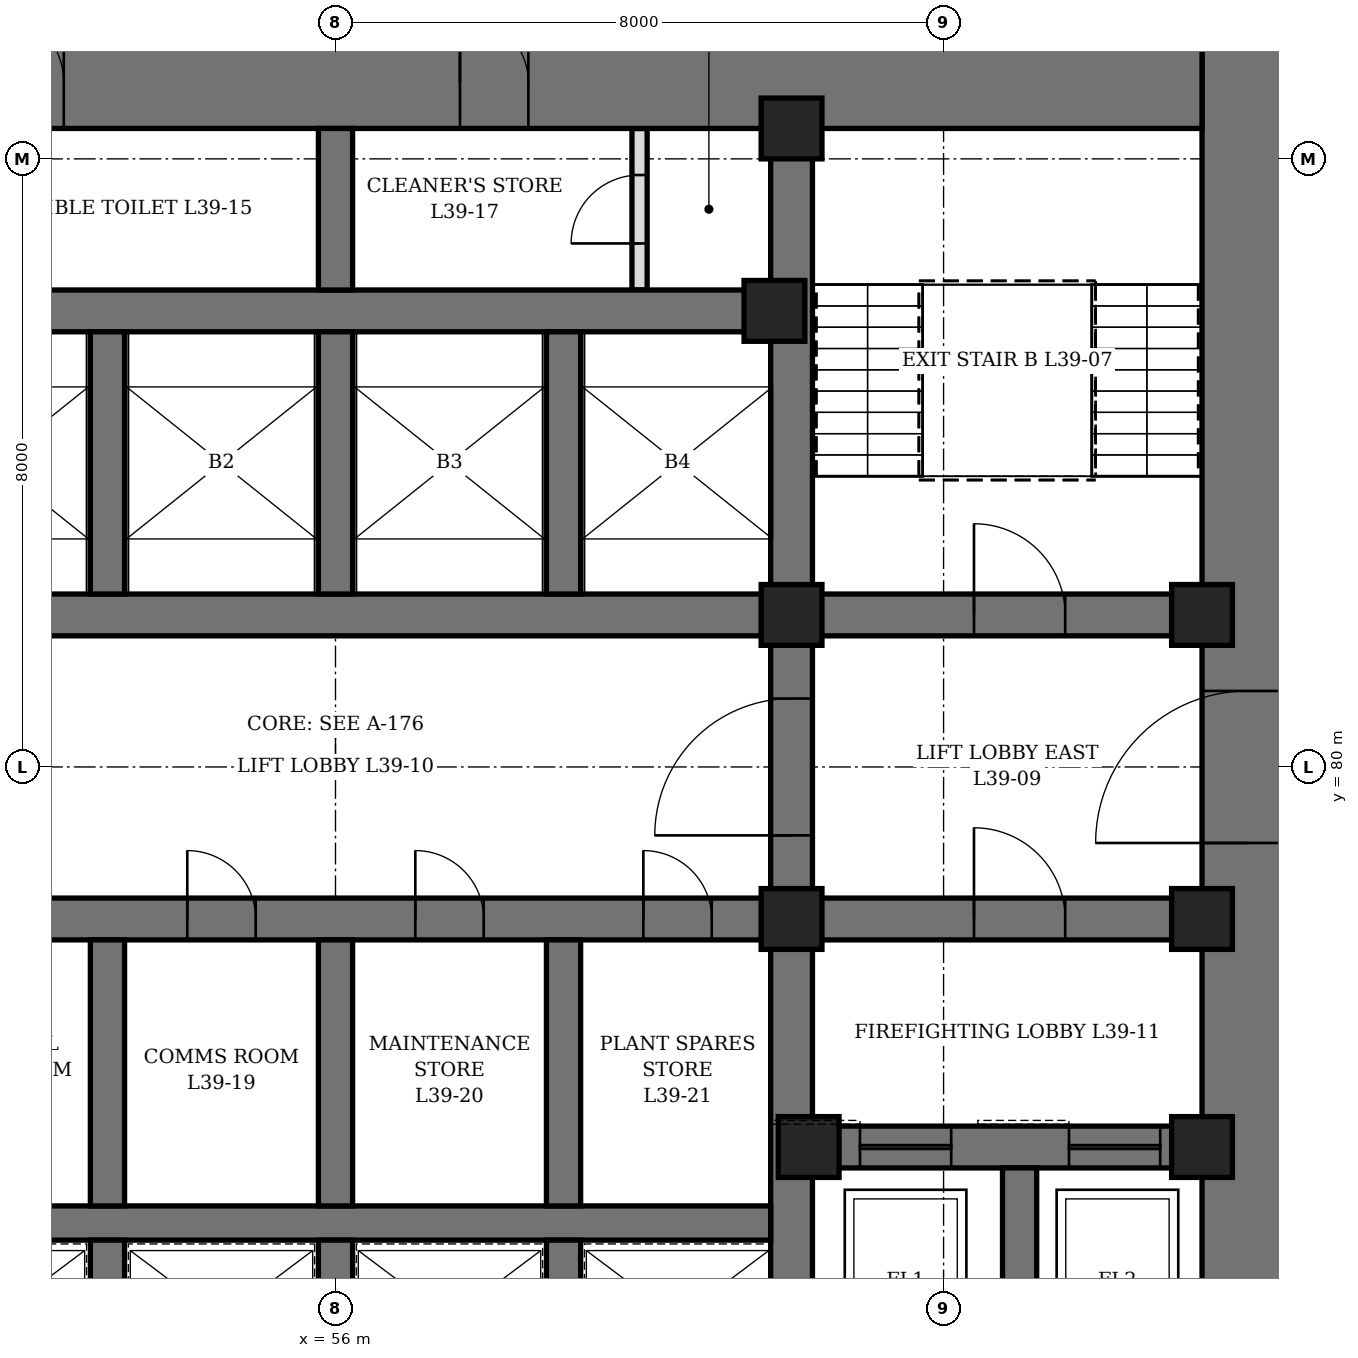
"""IFC4 building model, lengths in metres.
Left out: names, types, materials, properties, quantities, classifications, styles, units other than length and angle.
Written with IfcOpenShell. Run it as: python <this file> out.ifc"""

import sys

from ifc_helpers import new_model, si_unit, direction, frame, frame_2d, origin, origin_2d, place, context, subcontext, project, spatial, rectangle, hollow_rectangle, extrude, element, fill, save


model = new_model("IFC4")
c1 = context("Model", 3, precision=1e-05, world=origin(), true_north=direction((0.0, 1.0)))
c2 = subcontext(c1, "Body", "Model", "MODEL_VIEW")
j1 = project(units=[si_unit("LENGTHUNIT", "METRE"), si_unit("PLANEANGLEUNIT", "RADIAN")], contexts=[c1])
p1 = place(None, origin())
s1 = spatial("IfcSite", under=j1, at=p1, CompositionType="ELEMENT")
p2 = place(p1, origin())
s2 = spatial("IfcBuilding", under=s1, at=p2, CompositionType="ELEMENT")
p3 = place(p2, frame((0.0, 0.0, 175.3)))
s3 = spatial("IfcBuildingStorey", under=s2, at=p3, CompositionType="ELEMENT", Elevation=175.3)
p4 = place(p3, frame((68.0, 70.4, 0.0), z_axis=(0.0, 0.0, 1.0), x_axis=(0.0, 1.0, 0.0)))
e1 = element("IfcWall", 1, at=p4, inside=s3, PredefinedType="SHEAR", context=c2, shape_type="SweptSolid", body=[
    extrude(rectangle(XDim=19.2, YDim=1.2, at=frame_2d((9.6, 0.0))), origin(), (0.0, 0.0, 1.0), 6.0),
])
p5 = place(p4, frame((8.6, 0.0, 0.0)))
e2 = element("IfcOpeningElement", 2, at=p5, cuts=e1, PredefinedType="OPENING", context=c2, shape_type="SweptSolid", body=[
    extrude(rectangle(XDim=2.0, YDim=2.4, at=frame_2d((1.0, 1.2))), frame((0.0, 0.61, 0.0), z_axis=(0.0, -1.0, 0.0), x_axis=(1.0, 0.0, 0.0)), (0.0, 0.0, 1.0), 1.22),
])
p6 = place(p3, frame((44.6, 89.0, 0.0), z_axis=(0.0, 0.0, 1.0), x_axis=(1.0, 0.0, 0.0)))
e3 = element("IfcWall", 3, at=p6, inside=s3, PredefinedType="SHEAR", context=c2, shape_type="SweptSolid", body=[
    extrude(rectangle(XDim=22.8, YDim=1.2, at=frame_2d((11.4, 0.0))), origin(), (0.0, 0.0, 1.0), 6.0),
])
p7 = place(p6, frame((6.825, 0.0, 0.0)))
e4 = element("IfcOpeningElement", 4, at=p7, cuts=e3, PredefinedType="OPENING", context=c2, shape_type="SweptSolid", body=[
    extrude(rectangle(XDim=1.0, YDim=2.1, at=frame_2d((0.5, 1.05))), frame((0.0, 0.61, 0.0), z_axis=(0.0, -1.0, 0.0), x_axis=(1.0, 0.0, 0.0)), (0.0, 0.0, 1.0), 1.22),
])
p8 = place(p6, frame((13.038, 0.0, 0.0)))
e5 = element("IfcOpeningElement", 5, at=p8, cuts=e3, PredefinedType="OPENING", context=c2, shape_type="SweptSolid", body=[
    extrude(rectangle(XDim=0.9, YDim=2.1, at=frame_2d((0.45, 1.05))), frame((0.0, 0.61, 0.0), z_axis=(0.0, -1.0, 0.0), x_axis=(1.0, 0.0, 0.0)), (0.0, 0.0, 1.0), 1.22),
])
p9 = place(p3, frame((62.0, 71.6, 0.0), z_axis=(0.0, 0.0, 1.0), x_axis=(0.0, 1.0, 0.0)))
e6 = element("IfcWall", 6, at=p9, inside=s3, PredefinedType="SHEAR", context=c2, shape_type="SweptSolid", body=[
    extrude(rectangle(XDim=16.8, YDim=0.55, at=frame_2d((8.4, 0.0))), origin(), (0.0, 0.0, 1.0), 6.0),
])
p10 = place(p9, frame((7.5, 0.0, 0.0)))
e7 = element("IfcOpeningElement", 7, at=p10, cuts=e6, PredefinedType="OPENING", context=c2, shape_type="SweptSolid", body=[
    extrude(rectangle(XDim=1.8, YDim=2.4, at=frame_2d((0.9, 1.2))), frame((0.0, 0.285, 0.0), z_axis=(0.0, -1.0, 0.0), x_axis=(1.0, 0.0, 0.0)), (0.0, 0.0, 1.0), 0.57),
])
p11 = place(p3, frame((62.275, 75.0, 0.0), z_axis=(0.0, 0.0, 1.0), x_axis=(1.0, 0.0, 0.0)))
e8 = element("IfcWall", 8, at=p11, inside=s3, PredefinedType="SHEAR", context=c2, shape_type="SweptSolid", body=[
    extrude(rectangle(XDim=5.125, YDim=0.55, at=frame_2d((2.562, 0.0))), origin(), (0.0, 0.0, 1.0), 6.0),
])
p12 = place(p11, frame((0.625, 0.0, 0.0)))
e9 = element("IfcOpeningElement", 9, at=p12, cuts=e8, PredefinedType="OPENING", context=c2, shape_type="SweptSolid", body=[
    extrude(rectangle(XDim=1.2, YDim=2.2, at=frame_2d((0.6, 1.1))), frame((0.0, 0.285, 0.0), z_axis=(0.0, -1.0, 0.0), x_axis=(1.0, 0.0, 0.0)), (0.0, 0.0, 1.0), 0.57),
])
p13 = place(p11, frame((3.375, 0.0, 0.0)))
e10 = element("IfcOpeningElement", 10, at=p13, cuts=e8, PredefinedType="OPENING", context=c2, shape_type="SweptSolid", body=[
    extrude(rectangle(XDim=1.2, YDim=2.2, at=frame_2d((0.6, 1.1))), frame((0.0, 0.285, 0.0), z_axis=(0.0, -1.0, 0.0), x_axis=(1.0, 0.0, 0.0)), (0.0, 0.0, 1.0), 0.57),
])
p14 = place(p3, frame((62.275, 78.0, 0.0), z_axis=(0.0, 0.0, 1.0), x_axis=(1.0, 0.0, 0.0)))
e11 = element("IfcWall", 11, at=p14, inside=s3, PredefinedType="SHEAR", context=c2, shape_type="SweptSolid", body=[
    extrude(rectangle(XDim=5.125, YDim=0.55, at=frame_2d((2.562, 0.0))), origin(), (0.0, 0.0, 1.0), 6.0),
])
p15 = place(p14, frame((2.125, 0.0, 0.0)))
e12 = element("IfcOpeningElement", 12, at=p15, cuts=e11, PredefinedType="OPENING", context=c2, shape_type="SweptSolid", body=[
    extrude(rectangle(XDim=1.2, YDim=2.1, at=frame_2d((0.6, 1.05))), frame((0.0, 0.285, 0.0), z_axis=(0.0, -1.0, 0.0), x_axis=(1.0, 0.0, 0.0)), (0.0, 0.0, 1.0), 0.57),
])
p16 = place(p3, frame((62.275, 82.0, 0.0), z_axis=(0.0, 0.0, 1.0), x_axis=(1.0, 0.0, 0.0)))
e13 = element("IfcWall", 13, at=p16, inside=s3, PredefinedType="SHEAR", context=c2, shape_type="SweptSolid", body=[
    extrude(rectangle(XDim=5.125, YDim=0.55, at=frame_2d((2.562, 0.0))), origin(), (0.0, 0.0, 1.0), 6.0),
])
p17 = place(p16, frame((2.125, 0.0, 0.0)))
e14 = element("IfcOpeningElement", 14, at=p17, cuts=e13, PredefinedType="OPENING", context=c2, shape_type="SweptSolid", body=[
    extrude(rectangle(XDim=1.2, YDim=2.1, at=frame_2d((0.6, 1.05))), frame((0.0, 0.285, 0.0), z_axis=(0.0, -1.0, 0.0), x_axis=(1.0, 0.0, 0.0)), (0.0, 0.0, 1.0), 0.57),
])
p18 = place(p3, frame((50.275, 78.0, 0.0), z_axis=(0.0, 0.0, 1.0), x_axis=(1.0, 0.0, 0.0)))
e15 = element("IfcWall", 15, at=p18, inside=s3, PredefinedType="SHEAR", context=c2, shape_type="SweptSolid", body=[
    extrude(rectangle(XDim=11.45, YDim=0.55, at=frame_2d((5.725, 0.0))), origin(), (0.0, 0.0, 1.0), 6.0),
])
p19 = place(p18, frame((0.775, 0.0, 0.0)))
e16 = element("IfcOpeningElement", 16, at=p19, cuts=e15, PredefinedType="OPENING", context=c2, shape_type="SweptSolid", body=[
    extrude(rectangle(XDim=0.9, YDim=2.1, at=frame_2d((0.45, 1.05))), frame((0.0, 0.285, 0.0), z_axis=(0.0, -1.0, 0.0), x_axis=(1.0, 0.0, 0.0)), (0.0, 0.0, 1.0), 0.57),
])
p20 = place(p18, frame((3.775, 0.0, 0.0)))
e17 = element("IfcOpeningElement", 17, at=p20, cuts=e15, PredefinedType="OPENING", context=c2, shape_type="SweptSolid", body=[
    extrude(rectangle(XDim=0.9, YDim=2.1, at=frame_2d((0.45, 1.05))), frame((0.0, 0.285, 0.0), z_axis=(0.0, -1.0, 0.0), x_axis=(1.0, 0.0, 0.0)), (0.0, 0.0, 1.0), 0.57),
])
p21 = place(p18, frame((6.775, 0.0, 0.0)))
e18 = element("IfcOpeningElement", 18, at=p21, cuts=e15, PredefinedType="OPENING", context=c2, shape_type="SweptSolid", body=[
    extrude(rectangle(XDim=0.9, YDim=2.1, at=frame_2d((0.45, 1.05))), frame((0.0, 0.285, 0.0), z_axis=(0.0, -1.0, 0.0), x_axis=(1.0, 0.0, 0.0)), (0.0, 0.0, 1.0), 0.57),
])
p22 = place(p18, frame((9.775, 0.0, 0.0)))
e19 = element("IfcOpeningElement", 19, at=p22, cuts=e15, PredefinedType="OPENING", context=c2, shape_type="SweptSolid", body=[
    extrude(rectangle(XDim=0.9, YDim=2.1, at=frame_2d((0.45, 1.05))), frame((0.0, 0.285, 0.0), z_axis=(0.0, -1.0, 0.0), x_axis=(1.0, 0.0, 0.0)), (0.0, 0.0, 1.0), 0.57),
])
for number, where, z_axis, x_axis in (
    (20, (50.275, 82.0, 0.0), (0.0, 0.0, 1.0), (1.0, 0.0, 0.0)),
    (21, (50.275, 86.0, 0.0), (0.0, 0.0, 1.0), (1.0, 0.0, 0.0)),
):
    element("IfcWall", number, at=place(p3, frame(where, z_axis=z_axis, x_axis=x_axis)), inside=s3, PredefinedType="SHEAR", context=c2, shape_type="SweptSolid", body=[
        extrude(rectangle(XDim=11.45, YDim=0.55, at=frame_2d((5.725, 0.0))), origin(), (0.0, 0.0, 1.0), 6.0),
    ])
p23 = place(p3, frame((50.275, 74.0, 0.0), z_axis=(0.0, 0.0, 1.0), x_axis=(1.0, 0.0, 0.0)))
e22 = element("IfcWall", 22, at=p23, inside=s3, PredefinedType="SHEAR", context=c2, shape_type="SweptSolid", body=[
    extrude(rectangle(XDim=11.45, YDim=0.45, at=frame_2d((5.725, 0.0))), origin(), (0.0, 0.0, 1.0), 6.0),
])
p24 = place(p3, frame((53.0, 71.6, 0.0), z_axis=(0.0, 0.0, 1.0), x_axis=(0.0, 1.0, 0.0)))
e23 = element("IfcWall", 23, at=p24, inside=s3, PredefinedType="SHEAR", context=c2, shape_type="SweptSolid", body=[
    extrude(rectangle(XDim=2.175, YDim=0.45, at=frame_2d((1.087, 0.0))), origin(), (0.0, 0.0, 1.0), 6.0),
])
p25 = place(p3, frame((53.0, 74.225, 0.0), z_axis=(0.0, 0.0, 1.0), x_axis=(0.0, 1.0, 0.0)))
e24 = element("IfcWall", 24, at=p25, inside=s3, PredefinedType="SHEAR", context=c2, shape_type="SweptSolid", body=[
    extrude(rectangle(XDim=3.5, YDim=0.45, at=frame_2d((1.75, 0.0))), origin(), (0.0, 0.0, 1.0), 6.0),
])
p26 = place(p3, frame((53.0, 82.275, 0.0), z_axis=(0.0, 0.0, 1.0), x_axis=(0.0, 1.0, 0.0)))
e25 = element("IfcWall", 25, at=p26, inside=s3, PredefinedType="SHEAR", context=c2, shape_type="SweptSolid", body=[
    extrude(rectangle(XDim=3.45, YDim=0.45, at=frame_2d((1.725, 0.0))), origin(), (0.0, 0.0, 1.0), 6.0),
])
p27 = place(p3, frame((56.0, 71.6, 0.0), z_axis=(0.0, 0.0, 1.0), x_axis=(0.0, 1.0, 0.0)))
e26 = element("IfcWall", 26, at=p27, inside=s3, PredefinedType="SHEAR", context=c2, shape_type="SweptSolid", body=[
    extrude(rectangle(XDim=2.175, YDim=0.45, at=frame_2d((1.087, 0.0))), origin(), (0.0, 0.0, 1.0), 6.0),
])
p28 = place(p3, frame((56.0, 74.225, 0.0), z_axis=(0.0, 0.0, 1.0), x_axis=(0.0, 1.0, 0.0)))
e27 = element("IfcWall", 27, at=p28, inside=s3, PredefinedType="SHEAR", context=c2, shape_type="SweptSolid", body=[
    extrude(rectangle(XDim=3.5, YDim=0.45, at=frame_2d((1.75, 0.0))), origin(), (0.0, 0.0, 1.0), 6.0),
])
p29 = place(p3, frame((56.0, 82.275, 0.0), z_axis=(0.0, 0.0, 1.0), x_axis=(0.0, 1.0, 0.0)))
e28 = element("IfcWall", 28, at=p29, inside=s3, PredefinedType="SHEAR", context=c2, shape_type="SweptSolid", body=[
    extrude(rectangle(XDim=3.45, YDim=0.45, at=frame_2d((1.725, 0.0))), origin(), (0.0, 0.0, 1.0), 6.0),
])
p30 = place(p3, frame((59.0, 71.6, 0.0), z_axis=(0.0, 0.0, 1.0), x_axis=(0.0, 1.0, 0.0)))
e29 = element("IfcWall", 29, at=p30, inside=s3, PredefinedType="SHEAR", context=c2, shape_type="SweptSolid", body=[
    extrude(rectangle(XDim=2.175, YDim=0.45, at=frame_2d((1.087, 0.0))), origin(), (0.0, 0.0, 1.0), 6.0),
])
p31 = place(p3, frame((59.0, 74.225, 0.0), z_axis=(0.0, 0.0, 1.0), x_axis=(0.0, 1.0, 0.0)))
e30 = element("IfcWall", 30, at=p31, inside=s3, PredefinedType="SHEAR", context=c2, shape_type="SweptSolid", body=[
    extrude(rectangle(XDim=3.5, YDim=0.45, at=frame_2d((1.75, 0.0))), origin(), (0.0, 0.0, 1.0), 6.0),
])
p32 = place(p3, frame((59.0, 82.275, 0.0), z_axis=(0.0, 0.0, 1.0), x_axis=(0.0, 1.0, 0.0)))
e31 = element("IfcWall", 31, at=p32, inside=s3, PredefinedType="SHEAR", context=c2, shape_type="SweptSolid", body=[
    extrude(rectangle(XDim=3.45, YDim=0.45, at=frame_2d((1.725, 0.0))), origin(), (0.0, 0.0, 1.0), 6.0),
])
p33 = place(p3, frame((65.0, 71.6, 0.0), z_axis=(0.0, 0.0, 1.0), x_axis=(0.0, 1.0, 0.0)))
e32 = element("IfcWall", 32, at=p33, inside=s3, PredefinedType="SHEAR", context=c2, shape_type="SweptSolid", body=[
    extrude(rectangle(XDim=3.125, YDim=0.45, at=frame_2d((1.562, 0.0))), origin(), (0.0, 0.0, 1.0), 6.0),
])
p34 = place(p3, frame((56.0, 86.275, 0.0), z_axis=(0.0, 0.0, 1.0), x_axis=(0.0, 1.0, 0.0)))
e33 = element("IfcWall", 33, at=p34, inside=s3, PredefinedType="SHEAR", context=c2, shape_type="SweptSolid", body=[
    extrude(rectangle(XDim=2.125, YDim=0.45, at=frame_2d((1.062, 0.0))), origin(), (0.0, 0.0, 1.0), 6.0),
])
for number, where, z_axis, x_axis in (
    (34, (61.775, 86.0, 0.0), (0.0, 0.0, 1.0), (1.0, 0.0, 0.0)),
    (35, (62.0, 78.0, 0.0), (0.0, 0.0, 1.0), (1.0, 0.0, 0.0)),
    (36, (62.0, 82.0, 0.0), (0.0, 0.0, 1.0), (1.0, 0.0, 0.0)),
    (37, (62.0, 88.4, 0.0), (0.0, 0.0, 1.0), (1.0, 0.0, 0.0)),
    (38, (62.225, 75.0, 0.0), (0.0, 0.0, 1.0), (1.0, 0.0, 0.0)),
    (39, (67.4, 75.0, 0.0), (0.0, 0.0, 1.0), (1.0, 0.0, 0.0)),
    (40, (67.4, 78.0, 0.0), (0.0, 0.0, 1.0), (1.0, 0.0, 0.0)),
    (41, (67.4, 82.0, 0.0), (0.0, 0.0, 1.0), (1.0, 0.0, 0.0)),
):
    element("IfcColumn", number, at=place(p3, frame(where, z_axis=z_axis, x_axis=x_axis)), inside=s3, PredefinedType="COLUMN", context=c2, shape_type="SweptSolid", body=[
        extrude(hollow_rectangle(XDim=0.8, YDim=0.8, WallThickness=0.1, at=origin_2d()), origin(), (0.0, 0.0, 1.0), 6.0),
    ])
p35 = place(p3, frame((60.0, 86.275, 0.0), z_axis=(0.0, 0.0, 1.0), x_axis=(0.0, 1.0, 0.0)))
e42 = element("IfcWall", 42, at=p35, inside=s3, PredefinedType="PARTITIONING", context=c2, shape_type="SweptSolid", body=[
    extrude(rectangle(XDim=2.125, YDim=0.2, at=frame_2d((1.062, 0.0))), origin(), (0.0, 0.0, 1.0), 5.75),
])
p36 = place(p35, frame((0.613, 0.0, 0.0)))
e43 = element("IfcOpeningElement", 43, at=p36, cuts=e42, PredefinedType="OPENING", context=c2, shape_type="SweptSolid", body=[
    extrude(rectangle(XDim=0.9, YDim=2.1, at=frame_2d((0.45, 1.05))), frame((0.0, 0.11, 0.0), z_axis=(0.0, -1.0, 0.0), x_axis=(1.0, 0.0, 0.0)), (0.0, 0.0, 1.0), 0.22),
])
p37 = place(p7, origin())
e44 = element("IfcDoor", 44, at=p37, inside=s3, OperationType="SINGLE_SWING_LEFT", PredefinedType="DOOR", context=c2, shape_type="SweptSolid", body=[
    extrude(rectangle(XDim=1.0, YDim=2.1, at=frame_2d((0.5, 1.05))), frame((0.0, 0.35, 0.0), z_axis=(0.0, -1.0, 0.0), x_axis=(1.0, 0.0, 0.0)), (0.0, 0.0, 1.0), 0.7),
])
fill(e4, e44)
p38 = place(p8, origin())
e45 = element("IfcDoor", 45, at=p38, inside=s3, OperationType="SINGLE_SWING_LEFT", PredefinedType="DOOR", context=c2, shape_type="SweptSolid", body=[
    extrude(rectangle(XDim=0.9, YDim=2.1, at=frame_2d((0.45, 1.05))), frame((0.0, 0.35, 0.0), z_axis=(0.0, -1.0, 0.0), x_axis=(1.0, 0.0, 0.0)), (0.0, 0.0, 1.0), 0.7),
])
fill(e5, e45)
p39 = place(p36, origin())
e46 = element("IfcDoor", 46, at=p39, inside=s3, OperationType="SINGLE_SWING_LEFT", PredefinedType="DOOR", context=c2, shape_type="SweptSolid", body=[
    extrude(rectangle(XDim=0.9, YDim=2.1, at=frame_2d((0.45, 1.05))), frame((0.0, 0.1, 0.0), z_axis=(0.0, -1.0, 0.0), x_axis=(1.0, 0.0, 0.0)), (0.0, 0.0, 1.0), 0.199),
])
fill(e43, e46)
p40 = place(p20, origin())
e47 = element("IfcDoor", 47, at=p40, inside=s3, OperationType="SINGLE_SWING_LEFT", PredefinedType="DOOR", context=c2, shape_type="SweptSolid", body=[
    extrude(rectangle(XDim=0.9, YDim=2.1, at=frame_2d((0.45, 1.05))), frame((0.0, 0.275, 0.0), z_axis=(0.0, -1.0, 0.0), x_axis=(1.0, 0.0, 0.0)), (0.0, 0.0, 1.0), 0.55),
])
fill(e17, e47)
p41 = place(p21, origin())
e48 = element("IfcDoor", 48, at=p41, inside=s3, OperationType="SINGLE_SWING_LEFT", PredefinedType="DOOR", context=c2, shape_type="SweptSolid", body=[
    extrude(rectangle(XDim=0.9, YDim=2.1, at=frame_2d((0.45, 1.05))), frame((0.0, 0.275, 0.0), z_axis=(0.0, -1.0, 0.0), x_axis=(1.0, 0.0, 0.0)), (0.0, 0.0, 1.0), 0.55),
])
fill(e18, e48)
p42 = place(p22, origin())
e49 = element("IfcDoor", 49, at=p42, inside=s3, OperationType="SINGLE_SWING_LEFT", PredefinedType="DOOR", context=c2, shape_type="SweptSolid", body=[
    extrude(rectangle(XDim=0.9, YDim=2.1, at=frame_2d((0.45, 1.05))), frame((0.0, 0.275, 0.0), z_axis=(0.0, -1.0, 0.0), x_axis=(1.0, 0.0, 0.0)), (0.0, 0.0, 1.0), 0.55),
])
fill(e19, e49)
p43 = place(p17, origin())
e50 = element("IfcDoor", 50, at=p43, inside=s3, OperationType="SINGLE_SWING_LEFT", PredefinedType="DOOR", context=c2, shape_type="SweptSolid", body=[
    extrude(rectangle(XDim=1.2, YDim=2.1, at=frame_2d((0.6, 1.05))), frame((0.0, 0.275, 0.0), z_axis=(0.0, -1.0, 0.0), x_axis=(1.0, 0.0, 0.0)), (0.0, 0.0, 1.0), 0.55),
])
fill(e14, e50)
p44 = place(p5, origin())
e51 = element("IfcDoor", 51, at=p44, inside=s3, OperationType="DOUBLE_DOOR_SINGLE_SWING", PredefinedType="DOOR", context=c2, shape_type="SweptSolid", body=[
    extrude(rectangle(XDim=2.0, YDim=2.4, at=frame_2d((1.0, 1.2))), frame((0.0, 0.35, 0.0), z_axis=(0.0, -1.0, 0.0), x_axis=(1.0, 0.0, 0.0)), (0.0, 0.0, 1.0), 0.7),
])
fill(e2, e51)
p45 = place(p10, origin())
e52 = element("IfcDoor", 52, at=p45, inside=s3, OperationType="DOUBLE_DOOR_SINGLE_SWING", PredefinedType="DOOR", context=c2, shape_type="SweptSolid", body=[
    extrude(rectangle(XDim=1.8, YDim=2.4, at=frame_2d((0.9, 1.2))), frame((0.0, 0.275, 0.0), z_axis=(0.0, -1.0, 0.0), x_axis=(1.0, 0.0, 0.0)), (0.0, 0.0, 1.0), 0.55),
])
fill(e7, e52)
p46 = place(p15, origin())
e53 = element("IfcDoor", 53, at=p46, inside=s3, OperationType="SINGLE_SWING_RIGHT", PredefinedType="DOOR", context=c2, shape_type="SweptSolid", body=[
    extrude(rectangle(XDim=1.2, YDim=2.1, at=frame_2d((0.6, 1.05))), frame((0.0, 0.275, 0.0), z_axis=(0.0, -1.0, 0.0), x_axis=(1.0, 0.0, 0.0)), (0.0, 0.0, 1.0), 0.55),
])
fill(e12, e53)
p47 = place(p12, origin())
e54 = element("IfcDoor", 54, at=p47, inside=s3, OperationType="SLIDING_TO_LEFT", PredefinedType="DOOR", context=c2, shape_type="SweptSolid", body=[
    extrude(rectangle(XDim=1.2, YDim=2.2, at=frame_2d((0.6, 1.1))), frame((0.0, 0.275, 0.0), z_axis=(0.0, -1.0, 0.0), x_axis=(1.0, 0.0, 0.0)), (0.0, 0.0, 1.0), 0.55),
])
fill(e9, e54)
p48 = place(p13, origin())
e55 = element("IfcDoor", 55, at=p48, inside=s3, OperationType="SLIDING_TO_LEFT", PredefinedType="DOOR", context=c2, shape_type="SweptSolid", body=[
    extrude(rectangle(XDim=1.2, YDim=2.2, at=frame_2d((0.6, 1.1))), frame((0.0, 0.275, 0.0), z_axis=(0.0, -1.0, 0.0), x_axis=(1.0, 0.0, 0.0)), (0.0, 0.0, 1.0), 0.55),
])
fill(e10, e55)
save(model, sys.argv[1])
